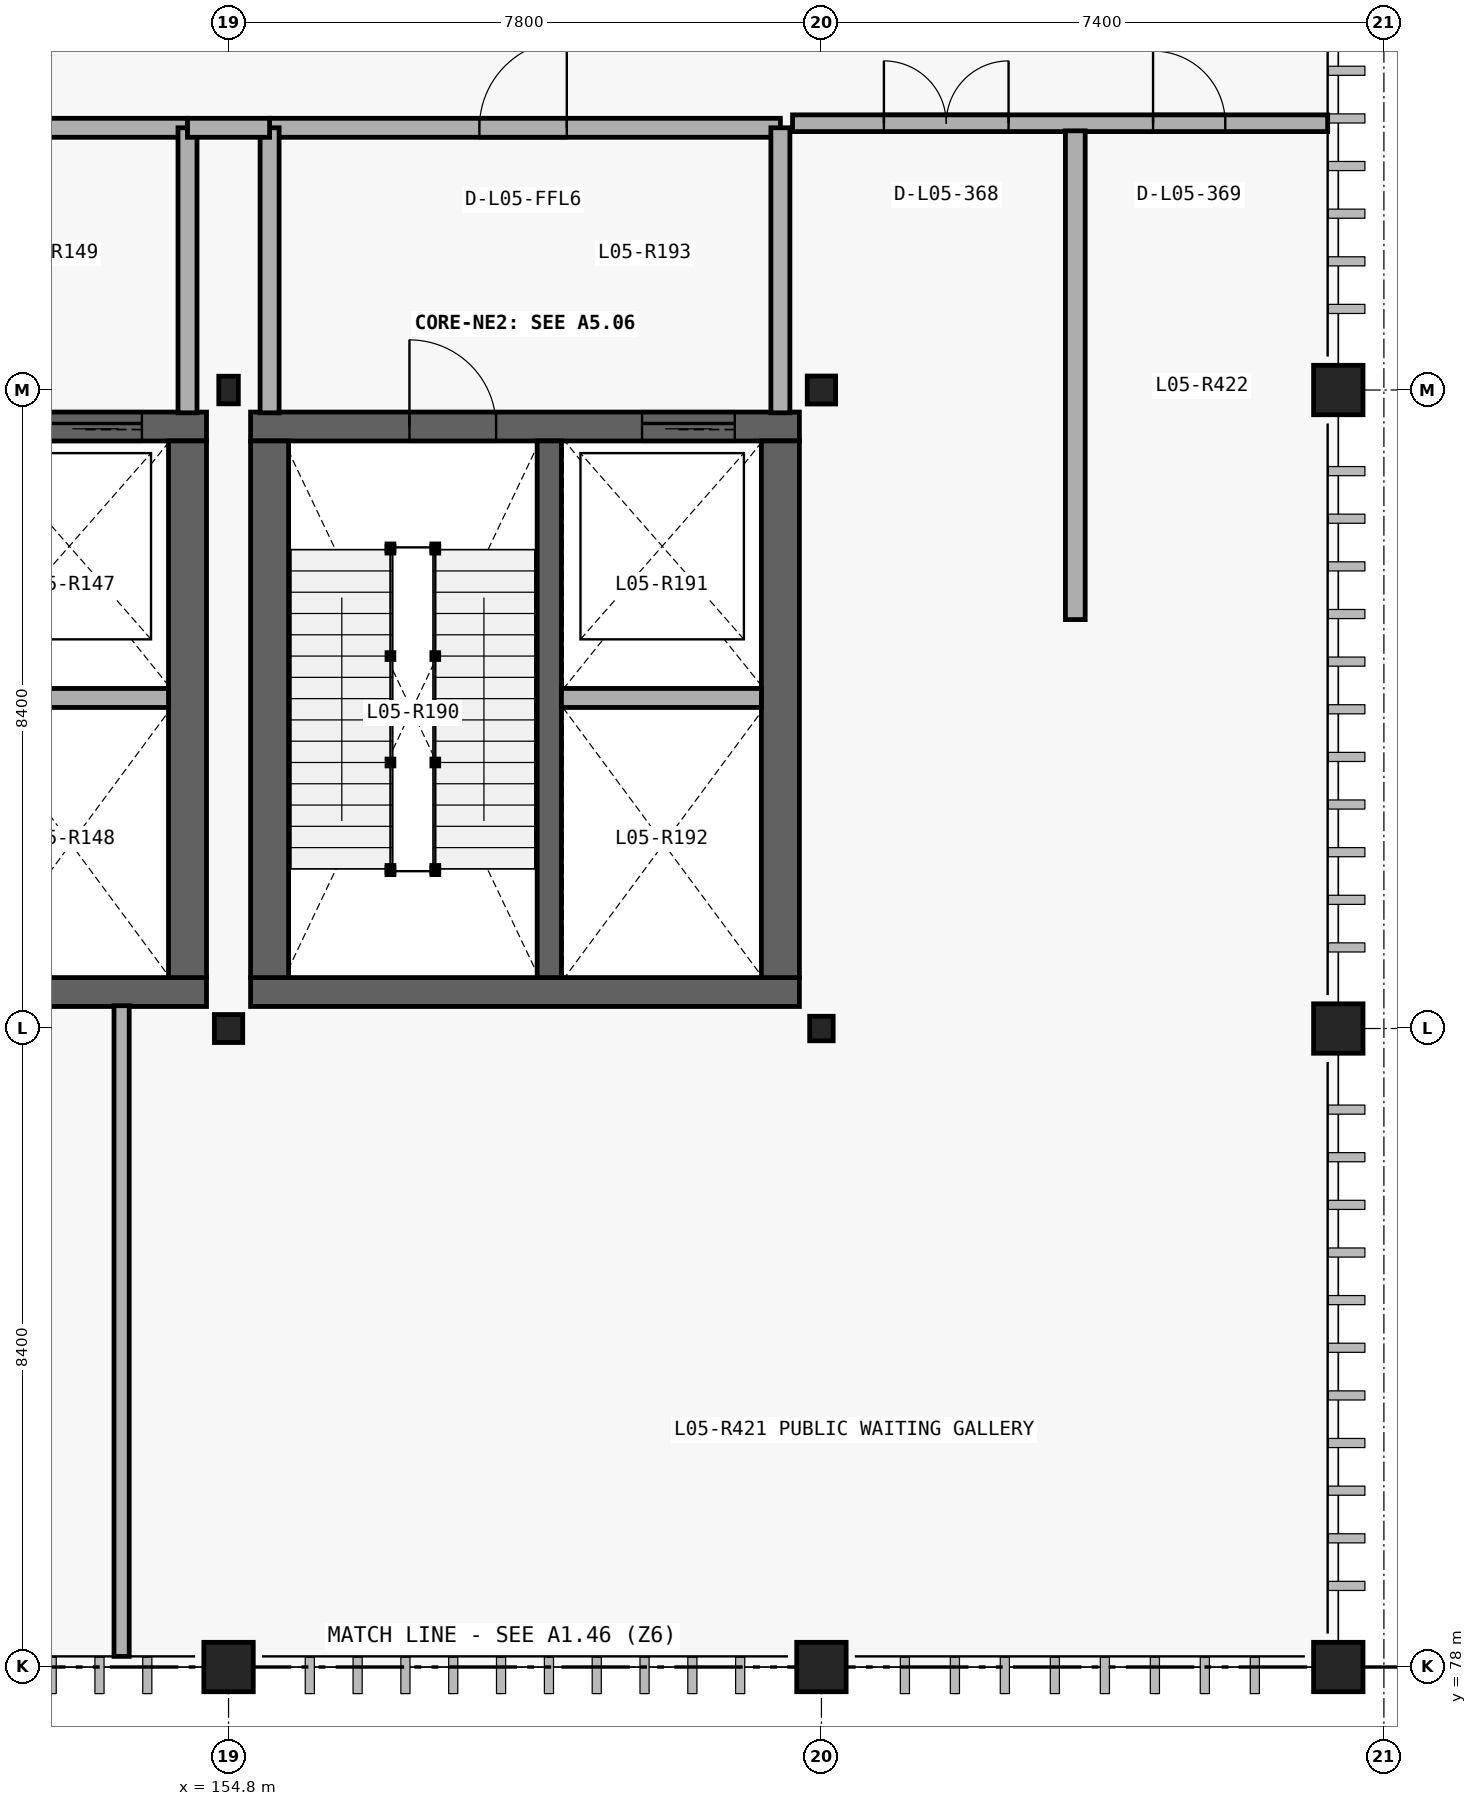
"""IFC4 building model, lengths in metres.
Left out: names, types, materials, properties, quantities, classifications, styles, units other than length and angle.
Written with IfcOpenShell. Run it as: python <this file> out.ifc"""

import sys

from ifc_helpers import new_model, si_unit, direction, frame, frame_2d, origin_with_axes, origin_2d_with_axis, place, context, subcontext, project, spatial, rectangle, circle, i_section, extrude, element, fill, save


model = new_model("IFC4")
c1 = context("Model", 3, precision=1e-05, world=origin_with_axes(), true_north=direction((0.0, 1.0)))
c2 = subcontext(c1, "Body", "Model", "MODEL_VIEW")
j1 = project(units=[si_unit("LENGTHUNIT", "METRE"), si_unit("PLANEANGLEUNIT", "RADIAN")], contexts=[c1])
p1 = place(None, origin_with_axes())
s1 = spatial("IfcSite", under=j1, at=p1, CompositionType="ELEMENT")
p2 = place(p1, origin_with_axes())
s2 = spatial("IfcBuilding", under=s1, at=p2, CompositionType="ELEMENT")
p3 = place(p2, frame((0.0, 0.0, 24.9), z_axis=(0.0, 0.0, 1.0), x_axis=(1.0, 0.0, 0.0)))
s3 = spatial("IfcBuildingStorey", under=s2, at=p3, CompositionType="ELEMENT", Elevation=24.9)
p4 = place(None, frame((147.29, 86.88, 24.9), z_axis=(0.0, 0.0, 1.0), x_axis=(1.0, 0.0, 0.0)))
e1 = element("IfcWall", 1, at=p4, inside=s3, PredefinedType="SHEAR", context=c2, shape_type="SweptSolid", body=[
    extrude(rectangle(XDim=7.22, YDim=0.38, at=frame_2d((3.61, 0.0), x_axis=(1.0, 0.0))), origin_with_axes(), (0.0, 0.0, 1.0), 4.8),
])
p5 = place(None, frame((154.51, 94.32, 24.9), z_axis=(0.0, 0.0, 1.0), x_axis=(-1.0, 0.0, 0.0)))
e2 = element("IfcWall", 2, at=p5, inside=s3, PredefinedType="SHEAR", context=c2, shape_type="SweptSolid", body=[
    extrude(rectangle(XDim=7.22, YDim=0.38, at=frame_2d((3.61, 0.0), x_axis=(1.0, 0.0))), origin_with_axes(), (0.0, 0.0, 1.0), 4.8),
])
p6 = place(None, frame((149.95, 94.32, 24.9), z_axis=(0.0, 0.0, 1.0), x_axis=(-1.0, 0.0, 0.0)))
e3 = element("IfcOpeningElement", 3, at=p6, cuts=e2, PredefinedType="OPENING", context=c2, shape_type="SweptSolid", body=[
    extrude(rectangle(XDim=1.14, YDim=2.18, at=frame_2d((0.0, 1.09), x_axis=(1.0, 0.0))), frame((0.0, 0.2, 0.0), z_axis=(0.0, -1.0, 0.0), x_axis=(1.0, 0.0, 0.0)), (0.0, 0.0, 1.0), 0.4),
])
p7 = place(None, frame((153.05, 94.32, 24.9), z_axis=(0.0, 0.0, 1.0), x_axis=(-1.0, 0.0, 0.0)))
e4 = element("IfcOpeningElement", 4, at=p7, cuts=e2, PredefinedType="OPENING", context=c2, shape_type="SweptSolid", body=[
    extrude(rectangle(XDim=1.22, YDim=2.28, at=frame_2d((0.0, 1.14), x_axis=(1.0, 0.0))), frame((0.0, 0.2, 0.0), z_axis=(0.0, -1.0, 0.0), x_axis=(1.0, 0.0, 0.0)), (0.0, 0.0, 1.0), 0.4),
])
p8 = place(None, frame((154.26, 87.07, 24.9), z_axis=(0.0, 0.0, 1.0), x_axis=(0.0, 1.0, 0.0)))
e5 = element("IfcWall", 5, at=p8, inside=s3, PredefinedType="SHEAR", context=c2, shape_type="SweptSolid", body=[
    extrude(rectangle(XDim=7.06, YDim=0.5, at=frame_2d((3.53, 0.0), x_axis=(1.0, 0.0))), origin_with_axes(), (0.0, 0.0, 1.0), 4.8),
])
p9 = place(None, frame((151.38, 90.749, 24.9), z_axis=(0.0, 0.0, 1.0), x_axis=(1.0, 0.0, 0.0)))
e6 = element("IfcWall", 6, at=p9, inside=s3, PredefinedType="PARTITIONING", context=c2, shape_type="SweptSolid", body=[
    extrude(rectangle(XDim=2.63, YDim=0.25, at=frame_2d((1.315, 0.0), x_axis=(1.0, 0.0))), origin_with_axes(), (0.0, 0.0, 1.0), 4.44),
])
p10 = place(None, frame((154.26, 98.25, 24.9), z_axis=(0.0, 0.0, 1.0), x_axis=(-1.0, 0.0, 0.0)))
e7 = element("IfcWall", 7, at=p10, inside=s3, PredefinedType="PARTITIONING", context=c2, shape_type="SweptSolid", body=[
    extrude(rectangle(XDim=6.72, YDim=0.25, at=frame_2d((3.36, 0.0), x_axis=(1.0, 0.0))), origin_with_axes(), (0.0, 0.0, 1.0), 4.44),
])
p11 = place(None, frame((150.875, 98.25, 24.9), z_axis=(0.0, 0.0, 1.0), x_axis=(-1.0, 0.0, 0.0)))
e8 = element("IfcOpeningElement", 8, at=p11, cuts=e7, PredefinedType="OPENING", context=c2, shape_type="SweptSolid", body=[
    extrude(rectangle(XDim=1.15, YDim=2.25, at=frame_2d((0.0, 1.125), x_axis=(1.0, 0.0))), frame((0.0, 0.135, 0.0), z_axis=(0.0, -1.0, 0.0), x_axis=(1.0, 0.0, 0.0)), (0.0, 0.0, 1.0), 0.27),
])
p12 = place(None, frame((154.26, 94.5, 24.9), z_axis=(0.0, 0.0, 1.0), x_axis=(0.0, 1.0, 0.0)))
e9 = element("IfcWall", 9, at=p12, inside=s3, PredefinedType="PARTITIONING", context=c2, shape_type="SweptSolid", body=[
    extrude(rectangle(XDim=3.75, YDim=0.25, at=frame_2d((1.875, 0.0), x_axis=(1.0, 0.0))), origin_with_axes(), (0.0, 0.0, 1.0), 4.44),
])
p13 = place(None, frame((155.09, 86.88, 24.9), z_axis=(0.0, 0.0, 1.0), x_axis=(1.0, 0.0, 0.0)))
e10 = element("IfcWall", 10, at=p13, inside=s3, PredefinedType="SHEAR", context=c2, shape_type="SweptSolid", body=[
    extrude(rectangle(XDim=7.22, YDim=0.38, at=frame_2d((3.61, 0.0), x_axis=(1.0, 0.0))), origin_with_axes(), (0.0, 0.0, 1.0), 4.8),
])
p14 = place(None, frame((162.31, 94.32, 24.9), z_axis=(0.0, 0.0, 1.0), x_axis=(-1.0, 0.0, 0.0)))
e11 = element("IfcWall", 11, at=p14, inside=s3, PredefinedType="SHEAR", context=c2, shape_type="SweptSolid", body=[
    extrude(rectangle(XDim=7.22, YDim=0.38, at=frame_2d((3.61, 0.0), x_axis=(1.0, 0.0))), origin_with_axes(), (0.0, 0.0, 1.0), 4.8),
])
p15 = place(None, frame((157.75, 94.32, 24.9), z_axis=(0.0, 0.0, 1.0), x_axis=(-1.0, 0.0, 0.0)))
e12 = element("IfcOpeningElement", 12, at=p15, cuts=e11, PredefinedType="OPENING", context=c2, shape_type="SweptSolid", body=[
    extrude(rectangle(XDim=1.14, YDim=2.18, at=frame_2d((0.0, 1.09), x_axis=(1.0, 0.0))), frame((0.0, 0.2, 0.0), z_axis=(0.0, -1.0, 0.0), x_axis=(1.0, 0.0, 0.0)), (0.0, 0.0, 1.0), 0.4),
])
p16 = place(None, frame((160.85, 94.32, 24.9), z_axis=(0.0, 0.0, 1.0), x_axis=(-1.0, 0.0, 0.0)))
e13 = element("IfcOpeningElement", 13, at=p16, cuts=e11, PredefinedType="OPENING", context=c2, shape_type="SweptSolid", body=[
    extrude(rectangle(XDim=1.22, YDim=2.28, at=frame_2d((0.0, 1.14), x_axis=(1.0, 0.0))), frame((0.0, 0.2, 0.0), z_axis=(0.0, -1.0, 0.0), x_axis=(1.0, 0.0, 0.0)), (0.0, 0.0, 1.0), 0.4),
])
for number, where, z_axis, x_axis in (
    (14, (162.06, 87.07, 24.9), (0.0, 0.0, 1.0), (0.0, 1.0, 0.0)),
    (15, (155.34, 94.13, 24.9), (0.0, 0.0, 1.0), (0.0, -1.0, 0.0)),
):
    element("IfcWall", number, at=place(None, frame(where, z_axis=z_axis, x_axis=x_axis)), inside=s3, PredefinedType="SHEAR", context=c2, shape_type="SweptSolid", body=[
        extrude(rectangle(XDim=7.06, YDim=0.5, at=frame_2d((3.53, 0.0), x_axis=(1.0, 0.0))), origin_with_axes(), (0.0, 0.0, 1.0), 4.8),
    ])
p17 = place(None, frame((159.02, 87.07, 24.9), z_axis=(0.0, 0.0, 1.0), x_axis=(0.0, 1.0, 0.0)))
e16 = element("IfcWall", 16, at=p17, inside=s3, PredefinedType="SHEAR", context=c2, shape_type="SweptSolid", body=[
    extrude(rectangle(XDim=7.06, YDim=0.32, at=frame_2d((3.53, 0.0), x_axis=(1.0, 0.0))), origin_with_axes(), (0.0, 0.0, 1.0), 4.8),
])
p18 = place(None, frame((159.18, 90.749, 24.9), z_axis=(0.0, 0.0, 1.0), x_axis=(1.0, 0.0, 0.0)))
e17 = element("IfcWall", 17, at=p18, inside=s3, PredefinedType="PARTITIONING", context=c2, shape_type="SweptSolid", body=[
    extrude(rectangle(XDim=2.63, YDim=0.25, at=frame_2d((1.315, 0.0), x_axis=(1.0, 0.0))), origin_with_axes(), (0.0, 0.0, 1.0), 4.44),
])
p19 = place(None, frame((162.06, 98.25, 24.9), z_axis=(0.0, 0.0, 1.0), x_axis=(-1.0, 0.0, 0.0)))
e18 = element("IfcWall", 18, at=p19, inside=s3, PredefinedType="PARTITIONING", context=c2, shape_type="SweptSolid", body=[
    extrude(rectangle(XDim=6.72, YDim=0.25, at=frame_2d((3.36, 0.0), x_axis=(1.0, 0.0))), origin_with_axes(), (0.0, 0.0, 1.0), 4.44),
])
p20 = place(None, frame((158.675, 98.25, 24.9), z_axis=(0.0, 0.0, 1.0), x_axis=(-1.0, 0.0, 0.0)))
e19 = element("IfcOpeningElement", 19, at=p20, cuts=e18, PredefinedType="OPENING", context=c2, shape_type="SweptSolid", body=[
    extrude(rectangle(XDim=1.15, YDim=2.25, at=frame_2d((0.0, 1.125), x_axis=(1.0, 0.0))), frame((0.0, 0.135, 0.0), z_axis=(0.0, -1.0, 0.0), x_axis=(1.0, 0.0, 0.0)), (0.0, 0.0, 1.0), 0.27),
])
for number, where, z_axis, x_axis in (
    (20, (155.34, 94.5, 24.9), (0.0, 0.0, 1.0), (0.0, 1.0, 0.0)),
    (21, (162.06, 94.5, 24.9), (0.0, 0.0, 1.0), (0.0, 1.0, 0.0)),
):
    element("IfcWall", number, at=place(None, frame(where, z_axis=z_axis, x_axis=x_axis)), inside=s3, PredefinedType="PARTITIONING", context=c2, shape_type="SweptSolid", body=[
        extrude(rectangle(XDim=3.75, YDim=0.25, at=frame_2d((1.875, 0.0), x_axis=(1.0, 0.0))), origin_with_axes(), (0.0, 0.0, 1.0), 4.44),
    ])
p21 = place(None, frame((154.26, 98.25, 24.9), z_axis=(0.0, 0.0, 1.0), x_axis=(1.0, 0.0, 0.0)))
e22 = element("IfcWall", 22, at=p21, inside=s3, PredefinedType="PARTITIONING", context=c2, shape_type="SweptSolid", body=[
    extrude(rectangle(XDim=1.08, YDim=0.25, at=frame_2d((0.54, 0.0), x_axis=(1.0, 0.0))), origin_with_axes(), (0.0, 0.0, 1.0), 4.44),
])
p22 = place(None, frame((162.22, 98.31, 24.9), z_axis=(0.0, 0.0, 1.0), x_axis=(1.0, 0.0, 0.0)))
e23 = element("IfcWall", 23, at=p22, inside=s3, PredefinedType="PARTITIONING", context=c2, shape_type="SweptSolid", body=[
    extrude(rectangle(XDim=7.04, YDim=0.22, at=frame_2d((3.52, 0.0), x_axis=(1.0, 0.0))), origin_with_axes(), (0.0, 0.0, 1.0), 4.44),
])
p23 = place(None, frame((164.242, 98.31, 24.9), z_axis=(0.0, 0.0, 1.0), x_axis=(1.0, 0.0, 0.0)))
e24 = element("IfcOpeningElement", 24, at=p23, cuts=e23, PredefinedType="OPENING", context=c2, shape_type="SweptSolid", body=[
    extrude(rectangle(XDim=1.64, YDim=2.42, at=frame_2d((0.0, 1.21), x_axis=(1.0, 0.0))), frame((0.0, 0.12, 0.0), z_axis=(0.0, -1.0, 0.0), x_axis=(1.0, 0.0, 0.0)), (0.0, 0.0, 1.0), 0.24),
])
p24 = place(None, frame((167.438, 98.31, 24.9), z_axis=(0.0, 0.0, 1.0), x_axis=(1.0, 0.0, 0.0)))
e25 = element("IfcOpeningElement", 25, at=p24, cuts=e23, PredefinedType="OPENING", context=c2, shape_type="SweptSolid", body=[
    extrude(rectangle(XDim=0.95, YDim=2.1, at=frame_2d((0.0, 1.05), x_axis=(1.0, 0.0))), frame((0.0, 0.12, 0.0), z_axis=(0.0, -1.0, 0.0), x_axis=(1.0, 0.0, 0.0)), (0.0, 0.0, 1.0), 0.24),
])
p25 = place(None, frame((165.94, 91.78, 24.9), z_axis=(0.0, 0.0, 1.0), x_axis=(0.0, 1.0, 0.0)))
e26 = element("IfcWall", 26, at=p25, inside=s3, PredefinedType="PLUMBINGWALL", context=c2, shape_type="SweptSolid", body=[
    extrude(rectangle(XDim=6.43, YDim=0.26, at=frame_2d((3.215, 0.0), x_axis=(1.0, 0.0))), origin_with_axes(), (0.0, 0.0, 1.0), 4.44),
])
p26 = place(None, frame((153.393, 78.14, 24.9), z_axis=(0.0, 0.0, 1.0), x_axis=(0.0, 1.0, 0.0)))
e27 = element("IfcWall", 27, at=p26, inside=s3, PredefinedType="PARTITIONING", context=c2, shape_type="SweptSolid", body=[
    extrude(rectangle(XDim=8.56, YDim=0.2, at=frame_2d((4.28, 0.0), x_axis=(1.0, 0.0))), origin_with_axes(), (0.0, 0.0, 1.0), 4.44),
])
p27 = place(None, frame((154.8, 78.0, 24.9), z_axis=(0.0, 0.0, 1.0), x_axis=(1.0, 0.0, 0.0)))
e28 = element("IfcColumn", 28, at=p27, inside=s3, PredefinedType="COLUMN", context=c2, shape_type="SweptSolid", body=[
    extrude(circle(Radius=0.325, at=origin_2d_with_axis()), origin_with_axes(), (0.0, 0.0, 1.0), 4.8),
])
p28 = place(None, frame((154.8, 86.4, 24.9), z_axis=(0.0, 0.0, 1.0), x_axis=(1.0, 0.0, 0.0)))
e29 = element("IfcColumn", 29, at=p28, inside=s3, PredefinedType="COLUMN", context=c2, shape_type="SweptSolid", body=[
    extrude(i_section(OverallWidth=0.373, OverallDepth=0.368, WebThickness=0.015, FlangeThickness=0.024, at=origin_2d_with_axis()), origin_with_axes(), (0.0, 0.0, 1.0), 4.8),
])
p29 = place(None, frame((154.8, 94.8, 24.9), z_axis=(0.0, 0.0, 1.0), x_axis=(1.0, 0.0, 0.0)))
e30 = element("IfcColumn", 30, at=p29, inside=s3, PredefinedType="COLUMN", context=c2, shape_type="SweptSolid", body=[
    extrude(i_section(OverallWidth=0.257, OverallDepth=0.363, WebThickness=0.013, FlangeThickness=0.022, at=origin_2d_with_axis()), origin_with_axes(), (0.0, 0.0, 1.0), 4.8),
])
p30 = place(None, frame((162.6, 78.0, 24.9), z_axis=(0.0, 0.0, 1.0), x_axis=(1.0, 0.0, 0.0)))
e31 = element("IfcColumn", 31, at=p30, inside=s3, PredefinedType="COLUMN", context=c2, shape_type="SweptSolid", body=[
    extrude(circle(Radius=0.325, at=origin_2d_with_axis()), origin_with_axes(), (0.0, 0.0, 1.0), 4.8),
])
p31 = place(None, frame((162.6, 86.4, 24.9), z_axis=(0.0, 0.0, 1.0), x_axis=(1.0, 0.0, 0.0)))
e32 = element("IfcColumn", 32, at=p31, inside=s3, PredefinedType="COLUMN", context=c2, shape_type="SweptSolid", body=[
    extrude(i_section(OverallWidth=0.309, OverallDepth=0.323, WebThickness=0.014, FlangeThickness=0.023, at=origin_2d_with_axis()), origin_with_axes(), (0.0, 0.0, 1.0), 4.8),
])
p32 = place(None, frame((162.6, 94.8, 24.9), z_axis=(0.0, 0.0, 1.0), x_axis=(1.0, 0.0, 0.0)))
e33 = element("IfcColumn", 33, at=p32, inside=s3, PredefinedType="COLUMN", context=c2, shape_type="SweptSolid", body=[
    extrude(i_section(OverallWidth=0.373, OverallDepth=0.368, WebThickness=0.015, FlangeThickness=0.024, at=origin_2d_with_axis()), origin_with_axes(), (0.0, 0.0, 1.0), 4.8),
])
for number, where, z_axis, x_axis in (
    (34, (169.4, 78.0, 24.9), (0.0, 0.0, 1.0), (1.0, 0.0, 0.0)),
    (35, (169.4, 86.4, 24.9), (0.0, 0.0, 1.0), (1.0, 0.0, 0.0)),
    (36, (169.4, 94.8, 24.9), (0.0, 0.0, 1.0), (1.0, 0.0, 0.0)),
):
    element("IfcColumn", number, at=place(None, frame(where, z_axis=z_axis, x_axis=x_axis)), inside=s3, PredefinedType="COLUMN", context=c2, shape_type="SweptSolid", body=[
        extrude(circle(Radius=0.325, at=origin_2d_with_axis()), origin_with_axes(), (0.0, 0.0, 1.0), 4.8),
    ])
p33 = place(None, frame((153.05, 94.32, 24.9), z_axis=(0.0, 0.0, 1.0), x_axis=(1.0, 0.0, 0.0)))
e37 = element("IfcDoor", 37, at=p33, inside=s3, OperationType="SLIDING_TO_LEFT", PredefinedType="DOOR", context=c2, shape_type="SweptSolid", body=[
    extrude(rectangle(XDim=1.22, YDim=2.28, at=frame_2d((0.0, 1.14), x_axis=(1.0, 0.0))), frame((0.0, 0.04, 0.0), z_axis=(0.0, -1.0, 0.0), x_axis=(1.0, 0.0, 0.0)), (0.0, 0.0, 1.0), 0.08),
])
fill(e4, e37)
p34 = place(None, frame((157.75, 94.32, 24.9), z_axis=(0.0, 0.0, 1.0), x_axis=(1.0, 0.0, 0.0)))
e38 = element("IfcDoor", 38, at=p34, inside=s3, OperationType="SINGLE_SWING_RIGHT", PredefinedType="DOOR", context=c2, shape_type="SweptSolid", body=[
    extrude(rectangle(XDim=1.14, YDim=2.18, at=frame_2d((0.0, 1.09), x_axis=(1.0, 0.0))), frame((0.0, 0.04, 0.0), z_axis=(0.0, -1.0, 0.0), x_axis=(1.0, 0.0, 0.0)), (0.0, 0.0, 1.0), 0.08),
])
fill(e12, e38)
p35 = place(None, frame((160.85, 94.32, 24.9), z_axis=(0.0, 0.0, 1.0), x_axis=(1.0, 0.0, 0.0)))
e39 = element("IfcDoor", 39, at=p35, inside=s3, OperationType="SLIDING_TO_LEFT", PredefinedType="DOOR", context=c2, shape_type="SweptSolid", body=[
    extrude(rectangle(XDim=1.22, YDim=2.28, at=frame_2d((0.0, 1.14), x_axis=(1.0, 0.0))), frame((0.0, 0.04, 0.0), z_axis=(0.0, -1.0, 0.0), x_axis=(1.0, 0.0, 0.0)), (0.0, 0.0, 1.0), 0.08),
])
fill(e13, e39)
p36 = place(None, frame((158.675, 98.25, 24.9), z_axis=(0.0, 0.0, 1.0), x_axis=(1.0, 0.0, 0.0)))
e40 = element("IfcDoor", 40, at=p36, inside=s3, OperationType="SINGLE_SWING_LEFT", PredefinedType="DOOR", context=c2, shape_type="SweptSolid", body=[
    extrude(rectangle(XDim=1.15, YDim=2.25, at=frame_2d((0.0, 1.125), x_axis=(1.0, 0.0))), frame((0.0, 0.04, 0.0), z_axis=(0.0, -1.0, 0.0), x_axis=(1.0, 0.0, 0.0)), (0.0, 0.0, 1.0), 0.08),
])
fill(e19, e40)
p37 = place(None, frame((164.242, 98.31, 24.9), z_axis=(0.0, 0.0, 1.0), x_axis=(1.0, 0.0, 0.0)))
e41 = element("IfcDoor", 41, at=p37, inside=s3, OperationType="DOUBLE_DOOR_SINGLE_SWING", PredefinedType="DOOR", context=c2, shape_type="SweptSolid", body=[
    extrude(rectangle(XDim=1.64, YDim=2.42, at=frame_2d((0.0, 1.21), x_axis=(1.0, 0.0))), frame((0.0, 0.04, 0.0), z_axis=(0.0, -1.0, 0.0), x_axis=(1.0, 0.0, 0.0)), (0.0, 0.0, 1.0), 0.08),
])
fill(e24, e41)
p38 = place(None, frame((167.438, 98.31, 24.9), z_axis=(0.0, 0.0, 1.0), x_axis=(1.0, 0.0, 0.0)))
e42 = element("IfcDoor", 42, at=p38, inside=s3, OperationType="SINGLE_SWING_LEFT", PredefinedType="DOOR", context=c2, shape_type="SweptSolid", body=[
    extrude(rectangle(XDim=0.95, YDim=2.1, at=frame_2d((0.0, 1.05), x_axis=(1.0, 0.0))), frame((0.0, 0.04, 0.0), z_axis=(0.0, -1.0, 0.0), x_axis=(1.0, 0.0, 0.0)), (0.0, 0.0, 1.0), 0.08),
])
fill(e25, e42)
save(model, sys.argv[1])
